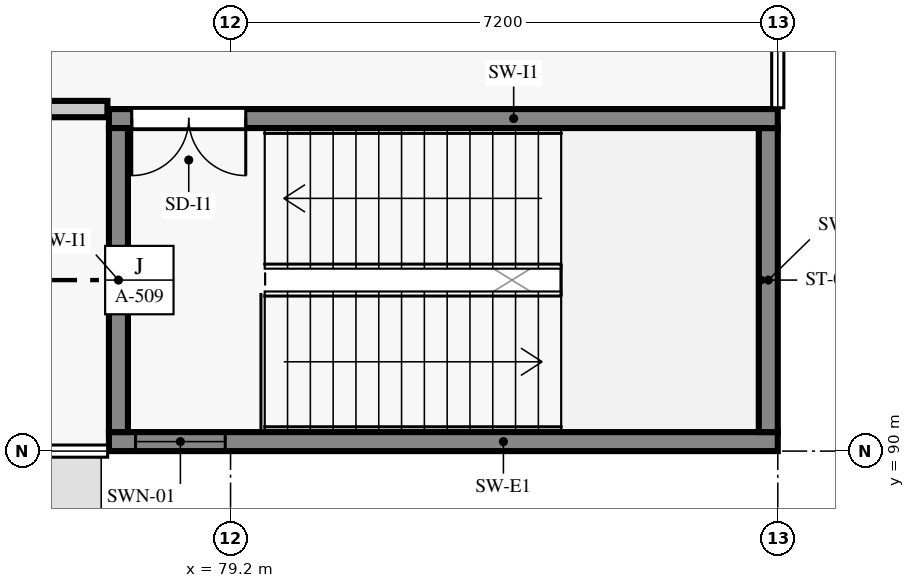
"""IFC4 building model, lengths in metres.
Left out: names, types, materials, properties, quantities, classifications, styles, units other than length and angle.
Written with IfcOpenShell. Run it as: python <this file> out.ifc"""

import sys

from ifc_helpers import new_model, si_unit, direction, frame, frame_2d, origin, place, context, subcontext, project, spatial, rectangle, extrude, element, fill, save


model = new_model("IFC4")
c1 = context("Model", 3, precision=1e-05, world=origin(), true_north=direction((0.0, 1.0)))
c2 = subcontext(c1, "Body", "Model", "MODEL_VIEW")
j1 = project(units=[si_unit("LENGTHUNIT", "METRE"), si_unit("PLANEANGLEUNIT", "RADIAN")], contexts=[c1])
p1 = place(None, origin())
s1 = spatial("IfcSite", under=j1, at=p1, CompositionType="ELEMENT")
p2 = place(p1, origin())
s2 = spatial("IfcBuilding", under=s1, at=p2, CompositionType="ELEMENT")
p3 = place(p2, frame((0.0, 0.0, 13.8)))
s3 = spatial("IfcBuildingStorey", under=s2, at=p3, CompositionType="ELEMENT", Elevation=13.8)
p4 = place(p3, frame((77.6, 90.125, 0.0), z_axis=(0.0, 0.0, 1.0), x_axis=(1.0, 0.0, 0.0)))
e1 = element("IfcWall", 1, at=p4, inside=s3, PredefinedType="SHEAR", context=c2, shape_type="SweptSolid", body=[
    extrude(rectangle(XDim=8.8, YDim=0.25, at=frame_2d((4.4, 0.0))), origin(), (0.0, 0.0, 1.0), 3.945),
])
p5 = place(p4, frame((0.35, 0.0, 0.92)))
e2 = element("IfcOpeningElement", 2, at=p5, cuts=e1, PredefinedType="OPENING", context=c2, shape_type="SweptSolid", body=[
    extrude(rectangle(XDim=1.18, YDim=1.48, at=frame_2d((0.59, 0.74))), frame((0.0, 0.135, 0.0), z_axis=(0.0, -1.0, 0.0), x_axis=(1.0, 0.0, 0.0)), (0.0, 0.0, 1.0), 0.27),
])
p6 = place(p3, frame((86.275, 90.25, 0.0), z_axis=(0.0, 0.0, 1.0), x_axis=(0.0, 1.0, 0.0)))
e3 = element("IfcWall", 3, at=p6, inside=s3, PredefinedType="SHEAR", context=c2, shape_type="SweptSolid", body=[
    extrude(rectangle(XDim=4.0, YDim=0.25, at=frame_2d((2.0, 0.0))), origin(), (0.0, 0.0, 1.0), 3.945),
])
p7 = place(p3, frame((86.4, 94.375, 0.0), z_axis=(0.0, 0.0, 1.0), x_axis=(-1.0, 0.0, 0.0)))
e4 = element("IfcWall", 4, at=p7, inside=s3, PredefinedType="SHEAR", context=c2, shape_type="SweptSolid", body=[
    extrude(rectangle(XDim=8.8, YDim=0.25, at=frame_2d((4.4, 0.0))), origin(), (0.0, 0.0, 1.0), 3.945),
])
p8 = place(p7, frame((7.0, 0.0, 0.0)))
e5 = element("IfcOpeningElement", 5, at=p8, cuts=e4, PredefinedType="OPENING", context=c2, shape_type="SweptSolid", body=[
    extrude(rectangle(XDim=1.5, YDim=2.15, at=frame_2d((0.75, 1.075))), frame((0.0, 0.135, 0.0), z_axis=(0.0, -1.0, 0.0), x_axis=(1.0, 0.0, 0.0)), (0.0, 0.0, 1.0), 0.27),
])
p9 = place(p3, frame((77.725, 94.25, 0.0), z_axis=(0.0, 0.0, 1.0), x_axis=(0.0, -1.0, 0.0)))
e6 = element("IfcWall", 6, at=p9, inside=s3, PredefinedType="SHEAR", context=c2, shape_type="SweptSolid", body=[
    extrude(rectangle(XDim=4.0, YDim=0.25, at=frame_2d((2.0, 0.0))), origin(), (0.0, 0.0, 1.0), 3.945),
])
p10 = place(p3, frame((71.02, 94.5, 0.0), z_axis=(0.0, 0.0, 1.0), x_axis=(1.0, 0.0, 0.0)))
e7 = element("IfcWall", 7, at=p10, inside=s3, PredefinedType="PARTITIONING", context=c2, shape_type="SweptSolid", body=[
    extrude(rectangle(XDim=6.56, YDim=0.215, at=frame_2d((3.28, 0.0))), origin(), (0.0, 0.0, 1.0), 3.395),
])
p11 = place(p10, frame((3.98, 0.0, 0.0)))
e8 = element("IfcOpeningElement", 8, at=p11, cuts=e7, PredefinedType="OPENING", context=c2, shape_type="SweptSolid", body=[
    extrude(rectangle(XDim=1.08, YDim=2.18, at=frame_2d((0.54, 1.09))), frame((0.0, 0.117, 0.0), z_axis=(0.0, -1.0, 0.0), x_axis=(1.0, 0.0, 0.0)), (0.0, 0.0, 1.0), 0.235),
])
p12 = place(p5, origin())
e9 = element("IfcWindow", 9, at=p12, inside=s3, PartitioningType="SINGLE_PANEL", PredefinedType="WINDOW", context=c2, shape_type="SweptSolid", body=[
    extrude(rectangle(XDim=1.18, YDim=1.48, at=frame_2d((0.59, 0.74))), frame((0.0, 0.03, 0.0), z_axis=(0.0, -1.0, 0.0), x_axis=(1.0, 0.0, 0.0)), (0.0, 0.0, 1.0), 0.06),
])
fill(e2, e9)
p13 = place(p8, origin())
e10 = element("IfcDoor", 10, at=p13, inside=s3, OperationType="DOUBLE_DOOR_SINGLE_SWING", PredefinedType="DOOR", context=c2, shape_type="SweptSolid", body=[
    extrude(rectangle(XDim=1.5, YDim=2.15, at=frame_2d((0.75, 1.075))), frame((0.0, 0.025, 0.0), z_axis=(0.0, -1.0, 0.0), x_axis=(1.0, 0.0, 0.0)), (0.0, 0.0, 1.0), 0.05),
])
fill(e5, e10)
save(model, sys.argv[1])
